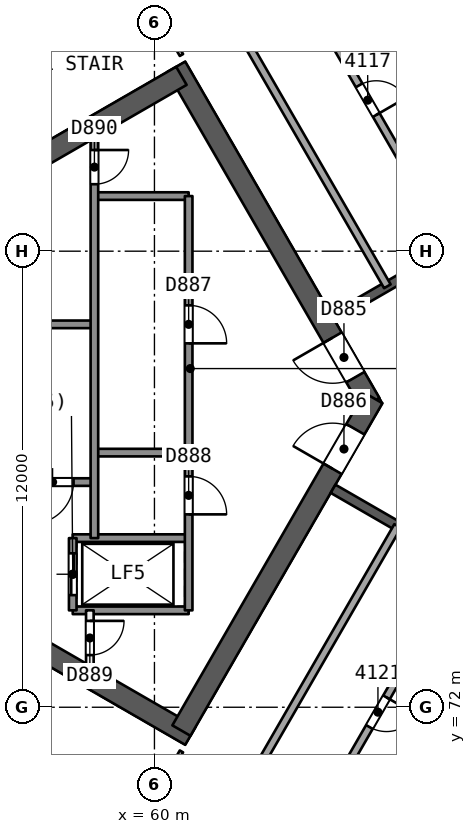
"""IFC4 building model, lengths in metres.
Left out: names, types, materials, properties, quantities, classifications, styles, units other than length and angle.
Written with IfcOpenShell. Run it as: python <this file> out.ifc"""

import sys

from ifc_helpers import new_model, si_unit, direction, frame, frame_2d, origin, place, context, subcontext, project, spatial, rectangle, extrude, element, fill, save


model = new_model("IFC4")
c1 = context("Model", 3, precision=1e-05, world=origin(), true_north=direction((0.0, 1.0)))
c2 = subcontext(c1, "Body", "Model", "MODEL_VIEW")
j1 = project(units=[si_unit("LENGTHUNIT", "METRE"), si_unit("PLANEANGLEUNIT", "RADIAN")], contexts=[c1])
p1 = place(None, origin())
s1 = spatial("IfcSite", under=j1, at=p1, CompositionType="ELEMENT")
p2 = place(p1, origin())
s2 = spatial("IfcBuilding", under=s1, at=p2, CompositionType="ELEMENT")
p3 = place(p2, frame((0.0, 0.0, 171.1)))
s3 = spatial("IfcBuildingStorey", under=s2, at=p3, CompositionType="ELEMENT", Elevation=171.1)
p4 = place(p3, frame((65.682, 80.0, 0.0), z_axis=(0.0, 0.0, 1.0), x_axis=(-0.500000202252, 0.866025287014, 0.0)))
e1 = element("IfcWall", 1, at=p4, inside=s3, PredefinedType="SHEAR", context=c2, shape_type="SweptSolid", body=[
    extrude(rectangle(XDim=10.221, YDim=0.55, at=frame_2d((5.111, 0.0))), origin(), (0.0, 0.0, 1.0), 3.7),
])
p5 = place(p4, frame((0.791, 0.0, 0.0)))
e2 = element("IfcOpeningElement", 2, at=p5, cuts=e1, PredefinedType="OPENING", context=c2, shape_type="SweptSolid", body=[
    extrude(rectangle(XDim=1.2, YDim=2.1, at=frame_2d((0.6, 1.05))), frame((0.0, 0.286, 0.0), z_axis=(0.0, -1.0, 0.0), x_axis=(1.0, 0.0, 0.0)), (0.0, 0.0, 1.0), 0.571),
])
p6 = place(p3, frame((60.709, 88.614, 0.0), z_axis=(0.0, 0.0, 1.0), x_axis=(-0.866020164116, -0.500009075263, 0.0)))
e3 = element("IfcWall", 3, at=p6, inside=s3, PredefinedType="SHEAR", context=c2, shape_type="SweptSolid", body=[
    extrude(rectangle(XDim=14.058, YDim=0.55, at=frame_2d((7.029, 0.0))), origin(), (0.0, 0.0, 1.0), 3.7),
])
p7 = place(p3, frame((48.672, 78.336, 0.0), z_axis=(0.0, 0.0, 1.0), x_axis=(0.866023530946, -0.500003243837, 0.0)))
e4 = element("IfcWall", 4, at=p7, inside=s3, PredefinedType="SHEAR", context=c2, shape_type="SweptSolid", body=[
    extrude(rectangle(XDim=14.175, YDim=0.55, at=frame_2d((7.087, 0.0))), origin(), (0.0, 0.0, 1.0), 3.7),
])
p8 = place(p3, frame((60.709, 71.386, 0.0), z_axis=(0.0, 0.0, 1.0), x_axis=(0.500015938302, 0.866016201606, 0.0)))
e5 = element("IfcWall", 5, at=p8, inside=s3, PredefinedType="SHEAR", context=c2, shape_type="SweptSolid", body=[
    extrude(rectangle(XDim=10.105, YDim=0.55, at=frame_2d((5.053, 0.0))), origin(), (0.0, 0.0, 1.0), 3.7),
])
p9 = place(p8, frame((7.955, 0.0, 0.0)))
e6 = element("IfcOpeningElement", 6, at=p9, cuts=e5, PredefinedType="OPENING", context=c2, shape_type="SweptSolid", body=[
    extrude(rectangle(XDim=1.2, YDim=2.1, at=frame_2d((0.6, 1.05))), frame((0.0, 0.286, 0.0), z_axis=(0.0, -1.0, 0.0), x_axis=(1.0, 0.0, 0.0)), (0.0, 0.0, 1.0), 0.571),
])
p10 = place(p3, frame((78.2, 90.046, 0.0), z_axis=(0.0, 0.0, 1.0), x_axis=(-0.866026492143, -0.499998114903, 0.0)))
e7 = element("IfcWall", 7, at=p10, inside=s3, PredefinedType="SHEAR", context=c2, shape_type="SweptSolid", body=[
    extrude(rectangle(XDim=15.588, YDim=0.25, at=frame_2d((7.794, 0.0))), origin(), (0.0, 0.0, 1.0), 3.25),
])
p11 = place(p10, frame((3.138, 0.0, 0.0)))
e8 = element("IfcOpeningElement", 8, at=p11, cuts=e7, PredefinedType="OPENING", context=c2, shape_type="SweptSolid", body=[
    extrude(rectangle(XDim=1.0, YDim=2.1, at=frame_2d((0.5, 1.05))), frame((0.0, 0.135, 0.0), z_axis=(0.0, -1.0, 0.0), x_axis=(1.0, 0.0, 0.0)), (0.0, 0.0, 1.0), 0.271),
])
p12 = place(p10, frame((5.629, 0.0, 0.0)))
e9 = element("IfcOpeningElement", 9, at=p12, cuts=e7, PredefinedType="OPENING", context=c2, shape_type="SweptSolid", body=[
    extrude(rectangle(XDim=0.9, YDim=2.1, at=frame_2d((0.45, 1.05))), frame((0.0, 0.135, 0.0), z_axis=(0.0, -1.0, 0.0), x_axis=(1.0, 0.0, 0.0)), (0.0, 0.0, 1.0), 0.271),
])
p13 = place(p10, frame((8.435, 0.0, 0.0)))
e10 = element("IfcOpeningElement", 10, at=p13, cuts=e7, PredefinedType="OPENING", context=c2, shape_type="SweptSolid", body=[
    extrude(rectangle(XDim=0.9, YDim=2.1, at=frame_2d((0.45, 1.05))), frame((0.0, 0.135, 0.0), z_axis=(0.0, -1.0, 0.0), x_axis=(1.0, 0.0, 0.0)), (0.0, 0.0, 1.0), 0.271),
])
p14 = place(p10, frame((12.438, 0.0, 0.0)))
e11 = element("IfcOpeningElement", 11, at=p14, cuts=e7, PredefinedType="OPENING", context=c2, shape_type="SweptSolid", body=[
    extrude(rectangle(XDim=1.0, YDim=2.1, at=frame_2d((0.5, 1.05))), frame((0.0, 0.135, 0.0), z_axis=(0.0, -1.0, 0.0), x_axis=(1.0, 0.0, 0.0)), (0.0, 0.0, 1.0), 0.271),
])
p15 = place(p3, frame((64.7, 77.748, 0.0), z_axis=(0.0, 0.0, 1.0), x_axis=(0.866026492143, -0.499998114903, 0.0)))
e12 = element("IfcWall", 12, at=p15, inside=s3, PredefinedType="SHEAR", context=c2, shape_type="SweptSolid", body=[
    extrude(rectangle(XDim=15.588, YDim=0.25, at=frame_2d((7.794, 0.0))), origin(), (0.0, 0.0, 1.0), 3.25),
])
p16 = place(p15, frame((2.462, 0.0, 0.0)))
e13 = element("IfcOpeningElement", 13, at=p16, cuts=e12, PredefinedType="OPENING", context=c2, shape_type="SweptSolid", body=[
    extrude(rectangle(XDim=1.0, YDim=2.1, at=frame_2d((0.5, 1.05))), frame((0.0, 0.135, 0.0), z_axis=(0.0, -1.0, 0.0), x_axis=(1.0, 0.0, 0.0)), (0.0, 0.0, 1.0), 0.271),
])
p17 = place(p15, frame((8.129, 0.0, 0.0)))
e14 = element("IfcOpeningElement", 14, at=p17, cuts=e12, PredefinedType="OPENING", context=c2, shape_type="SweptSolid", body=[
    extrude(rectangle(XDim=1.2, YDim=2.4, at=frame_2d((0.6, 1.2))), frame((0.0, 0.135, 0.0), z_axis=(0.0, -1.0, 0.0), x_axis=(1.0, 0.0, 0.0)), (0.0, 0.0, 1.0), 0.271),
])
p18 = place(p15, frame((11.762, 0.0, 0.0)))
e15 = element("IfcOpeningElement", 15, at=p18, cuts=e12, PredefinedType="OPENING", context=c2, shape_type="SweptSolid", body=[
    extrude(rectangle(XDim=1.0, YDim=2.1, at=frame_2d((0.5, 1.05))), frame((0.0, 0.135, 0.0), z_axis=(0.0, -1.0, 0.0), x_axis=(1.0, 0.0, 0.0)), (0.0, 0.0, 1.0), 0.271),
])
for number, where, z_axis, x_axis in (
    (16, (66.019, 96.179, 0.0), (0.0, 0.0, 1.0), (0.5, -0.866, 0.0)),
    (17, (63.589, 94.776, 0.0), (0.0, 0.0, 1.0), (0.5, -0.866, 0.0)),
):
    element("IfcWall", number, at=place(p3, frame(where, z_axis=z_axis, x_axis=x_axis)), inside=s3, PredefinedType="PARTITIONING", context=c2, shape_type="SweptSolid", body=[
        extrude(rectangle(XDim=11.402, YDim=0.2, at=frame_2d((5.701, 0.0))), origin(), (0.0, 0.0, 1.0), 3.25),
    ])
p19 = place(p3, frame((58.999, 92.126, 0.0), z_axis=(0.0, 0.0, 1.0), x_axis=(0.499981725576, -0.866035954271, 0.0)))
e18 = element("IfcWall", 18, at=p19, inside=s3, PredefinedType="PARTITIONING", context=c2, shape_type="SweptSolid", body=[
    extrude(rectangle(XDim=3.424, YDim=0.1, at=frame_2d((1.712, 0.0))), origin(), (0.0, 0.0, 1.0), 3.25),
])
p20 = place(p19, frame((1.262, 0.0, 0.0)))
e19 = element("IfcOpeningElement", 19, at=p20, cuts=e18, PredefinedType="OPENING", context=c2, shape_type="SweptSolid", body=[
    extrude(rectangle(XDim=0.9, YDim=2.1, at=frame_2d((0.45, 1.05))), frame((0.0, 0.061, 0.0), z_axis=(0.0, -1.0, 0.0), x_axis=(1.0, 0.0, 0.0)), (0.0, 0.0, 1.0), 0.121),
])
p21 = place(p3, frame((66.129, 83.077, 0.0), z_axis=(0.0, 0.0, 1.0), x_axis=(-0.5000018851, 0.866024315419, 0.0)))
e20 = element("IfcWall", 20, at=p21, inside=s3, PredefinedType="PARTITIONING", context=c2, shape_type="SweptSolid", body=[
    extrude(rectangle(XDim=9.0, YDim=0.2, at=frame_2d((4.5, 0.0))), origin(), (0.0, 0.0, 1.0), 3.25),
])
p22 = place(p3, frame((63.361, 91.871, 0.0), z_axis=(0.0, 0.0, 1.0), x_axis=(0.5000018851, -0.866024315419, 0.0)))
e21 = element("IfcWall", 21, at=p22, inside=s3, PredefinedType="PARTITIONING", context=c2, shape_type="SweptSolid", body=[
    extrude(rectangle(XDim=9.0, YDim=0.2, at=frame_2d((4.5, 0.0))), origin(), (0.0, 0.0, 1.0), 3.25),
])
p23 = place(p22, frame((4.05, 0.0, 0.0)))
e22 = element("IfcOpeningElement", 22, at=p23, cuts=e21, PredefinedType="OPENING", context=c2, shape_type="SweptSolid", body=[
    extrude(rectangle(XDim=0.9, YDim=2.1, at=frame_2d((0.45, 1.05))), frame((0.0, 0.11, 0.0), z_axis=(0.0, -1.0, 0.0), x_axis=(1.0, 0.0, 0.0)), (0.0, 0.0, 1.0), 0.221),
])
p24 = place(p3, frame((60.71, 70.838, 0.0), z_axis=(0.0, 0.0, 1.0), x_axis=(-0.499981725576, -0.866035954271, 0.0)))
e23 = element("IfcWall", 23, at=p24, inside=s3, PredefinedType="PARTITIONING", context=c2, shape_type="SweptSolid", body=[
    extrude(rectangle(XDim=3.424, YDim=0.1, at=frame_2d((1.712, 0.0))), origin(), (0.0, 0.0, 1.0), 3.25),
])
p25 = place(p24, frame((1.262, 0.0, 0.0)))
e24 = element("IfcOpeningElement", 24, at=p25, cuts=e23, PredefinedType="OPENING", context=c2, shape_type="SweptSolid", body=[
    extrude(rectangle(XDim=0.9, YDim=2.1, at=frame_2d((0.45, 1.05))), frame((0.0, 0.061, 0.0), z_axis=(0.0, -1.0, 0.0), x_axis=(1.0, 0.0, 0.0)), (0.0, 0.0, 1.0), 0.121),
])
p26 = place(p3, frame((68.131, 75.767, 0.0), z_axis=(0.0, 0.0, 1.0), x_axis=(-0.5000018851, -0.866024315419, 0.0)))
e25 = element("IfcWall", 25, at=p26, inside=s3, PredefinedType="PARTITIONING", context=c2, shape_type="SweptSolid", body=[
    extrude(rectangle(XDim=9.0, YDim=0.2, at=frame_2d((4.5, 0.0))), origin(), (0.0, 0.0, 1.0), 3.25),
])
p27 = place(p26, frame((4.05, 0.0, 0.0)))
e26 = element("IfcOpeningElement", 26, at=p27, cuts=e25, PredefinedType="OPENING", context=c2, shape_type="SweptSolid", body=[
    extrude(rectangle(XDim=0.9, YDim=2.1, at=frame_2d((0.45, 1.05))), frame((0.0, 0.11, 0.0), z_axis=(0.0, -1.0, 0.0), x_axis=(1.0, 0.0, 0.0)), (0.0, 0.0, 1.0), 0.221),
])
p28 = place(p3, frame((61.899, 68.973, 0.0), z_axis=(0.0, 0.0, 1.0), x_axis=(0.5000018851, 0.866024315419, 0.0)))
e27 = element("IfcWall", 27, at=p28, inside=s3, PredefinedType="PARTITIONING", context=c2, shape_type="SweptSolid", body=[
    extrude(rectangle(XDim=9.0, YDim=0.2, at=frame_2d((4.5, 0.0))), origin(), (0.0, 0.0, 1.0), 3.25),
])
p29 = place(p3, frame((64.129, 64.912, 0.0), z_axis=(0.0, 0.0, 1.0), x_axis=(0.499998613539, 0.866026204257, 0.0)))
e28 = element("IfcWall", 28, at=p29, inside=s3, PredefinedType="PARTITIONING", context=c2, shape_type="SweptSolid", body=[
    extrude(rectangle(XDim=11.402, YDim=0.2, at=frame_2d((5.701, 0.0))), origin(), (0.0, 0.0, 1.0), 3.25),
])
p30 = place(p3, frame((42.45, 82.744, 0.0), z_axis=(0.0, 0.0, 1.0), x_axis=(0.866024128163, 0.500002209434, 0.0)))
e29 = element("IfcWall", 29, at=p30, inside=s3, PredefinedType="SOLIDWALL", context=c2, shape_type="SweptSolid", body=[
    extrude(rectangle(XDim=53.635, YDim=0.3, at=frame_2d((26.817, 0.0))), origin(), (0.0, 0.0, 1.0), 3.25),
])
p31 = place(p30, frame((20.473, 0.0, 0.0)))
e30 = element("IfcOpeningElement", 30, at=p31, cuts=e29, PredefinedType="OPENING", context=c2, shape_type="SweptSolid", body=[
    extrude(rectangle(XDim=2.4, YDim=2.4, at=frame_2d((1.2, 1.2))), frame((0.0, 0.161, 0.0), z_axis=(0.0, -1.0, 0.0), x_axis=(1.0, 0.0, 0.0)), (0.0, 0.0, 1.0), 0.321),
])
p32 = place(p30, frame((9.514, 0.0, 0.0)))
e31 = element("IfcOpeningElement", 31, at=p32, cuts=e29, PredefinedType="OPENING", context=c2, shape_type="SweptSolid", body=[
    extrude(rectangle(XDim=2.4, YDim=2.4, at=frame_2d((1.2, 1.2))), frame((0.0, 0.161, 0.0), z_axis=(0.0, -1.0, 0.0), x_axis=(1.0, 0.0, 0.0)), (0.0, 0.0, 1.0), 0.321),
])
p33 = place(p30, frame((40.628, 0.0, 0.0)))
e32 = element("IfcOpeningElement", 32, at=p33, cuts=e29, PredefinedType="OPENING", context=c2, shape_type="SweptSolid", body=[
    extrude(rectangle(XDim=2.4, YDim=2.4, at=frame_2d((1.2, 1.2))), frame((0.0, 0.161, 0.0), z_axis=(0.0, -1.0, 0.0), x_axis=(1.0, 0.0, 0.0)), (0.0, 0.0, 1.0), 0.321),
])
p34 = place(p30, frame((27.632, 0.0, 0.9)))
e33 = element("IfcOpeningElement", 33, at=p34, cuts=e29, PredefinedType="OPENING", context=c2, shape_type="SweptSolid", body=[
    extrude(rectangle(XDim=1.8, YDim=1.5, at=frame_2d((0.9, 0.75))), frame((0.0, 0.161, 0.0), z_axis=(0.0, -1.0, 0.0), x_axis=(1.0, 0.0, 0.0)), (0.0, 0.0, 1.0), 0.321),
])
p35 = place(p30, frame((24.826, 0.0, 0.9)))
e34 = element("IfcOpeningElement", 34, at=p35, cuts=e29, PredefinedType="OPENING", context=c2, shape_type="SweptSolid", body=[
    extrude(rectangle(XDim=1.8, YDim=1.5, at=frame_2d((0.9, 0.75))), frame((0.0, 0.161, 0.0), z_axis=(0.0, -1.0, 0.0), x_axis=(1.0, 0.0, 0.0)), (0.0, 0.0, 1.0), 0.321),
])
p36 = place(p3, frame((88.899, 50.439, 0.0), z_axis=(0.0, 0.0, 1.0), x_axis=(-0.866024128163, 0.500002209434, 0.0)))
e35 = element("IfcWall", 35, at=p36, inside=s3, PredefinedType="SOLIDWALL", context=c2, shape_type="SweptSolid", body=[
    extrude(rectangle(XDim=53.635, YDim=0.3, at=frame_2d((26.817, 0.0))), origin(), (0.0, 0.0, 1.0), 3.25),
])
p37 = place(p36, frame((30.45, 0.0, 0.0)))
e36 = element("IfcOpeningElement", 36, at=p37, cuts=e35, PredefinedType="OPENING", context=c2, shape_type="SweptSolid", body=[
    extrude(rectangle(XDim=2.4, YDim=2.4, at=frame_2d((1.2, 1.2))), frame((0.0, 0.161, 0.0), z_axis=(0.0, -1.0, 0.0), x_axis=(1.0, 0.0, 0.0)), (0.0, 0.0, 1.0), 0.321),
])
p38 = place(p36, frame((41.683, 0.0, 0.0)))
e37 = element("IfcOpeningElement", 37, at=p38, cuts=e35, PredefinedType="OPENING", context=c2, shape_type="SweptSolid", body=[
    extrude(rectangle(XDim=2.4, YDim=2.4, at=frame_2d((1.2, 1.2))), frame((0.0, 0.161, 0.0), z_axis=(0.0, -1.0, 0.0), x_axis=(1.0, 0.0, 0.0)), (0.0, 0.0, 1.0), 0.321),
])
p39 = place(p36, frame((10.295, 0.0, 0.0)))
e38 = element("IfcOpeningElement", 38, at=p39, cuts=e35, PredefinedType="OPENING", context=c2, shape_type="SweptSolid", body=[
    extrude(rectangle(XDim=2.4, YDim=2.4, at=frame_2d((1.2, 1.2))), frame((0.0, 0.161, 0.0), z_axis=(0.0, -1.0, 0.0), x_axis=(1.0, 0.0, 0.0)), (0.0, 0.0, 1.0), 0.321),
])
p40 = place(p36, frame((24.982, 0.0, 0.9)))
e39 = element("IfcOpeningElement", 39, at=p40, cuts=e35, PredefinedType="OPENING", context=c2, shape_type="SweptSolid", body=[
    extrude(rectangle(XDim=1.8, YDim=1.5, at=frame_2d((0.9, 0.75))), frame((0.0, 0.161, 0.0), z_axis=(0.0, -1.0, 0.0), x_axis=(1.0, 0.0, 0.0)), (0.0, 0.0, 1.0), 0.321),
])
p41 = place(p3, frame((60.9, 85.45, 0.0), z_axis=(0.0, 0.0, 1.0), x_axis=(-1.0, 0.0, 0.0)))
e40 = element("IfcWall", 40, at=p41, inside=s3, PredefinedType="SOLIDWALL", context=c2, shape_type="SweptSolid", body=[
    extrude(rectangle(XDim=2.48, YDim=0.2, at=frame_2d((1.24, 0.0))), origin(), (0.0, 0.0, 1.0), 3.25),
])
p42 = place(p3, frame((58.42, 82.075, 0.0), z_axis=(0.0, 0.0, 1.0), x_axis=(-1.0, 0.0, 0.0)))
e41 = element("IfcWall", 41, at=p42, inside=s3, PredefinedType="SOLIDWALL", context=c2, shape_type="SweptSolid", body=[
    extrude(rectangle(XDim=7.7, YDim=0.2, at=frame_2d((3.85, 0.0))), origin(), (0.0, 0.0, 1.0), 3.25),
])
p43 = place(p3, frame((60.9, 78.7, 0.0), z_axis=(0.0, 0.0, 1.0), x_axis=(-1.0, 0.0, 0.0)))
e42 = element("IfcWall", 42, at=p43, inside=s3, PredefinedType="SOLIDWALL", context=c2, shape_type="SweptSolid", body=[
    extrude(rectangle(XDim=2.48, YDim=0.2, at=frame_2d((1.24, 0.0))), origin(), (0.0, 0.0, 1.0), 3.25),
])
p44 = place(p3, frame((58.42, 77.925, 0.0), z_axis=(0.0, 0.0, 1.0), x_axis=(-1.0, 0.0, 0.0)))
e43 = element("IfcWall", 43, at=p44, inside=s3, PredefinedType="SOLIDWALL", context=c2, shape_type="SweptSolid", body=[
    extrude(rectangle(XDim=7.7, YDim=0.2, at=frame_2d((3.85, 0.0))), origin(), (0.0, 0.0, 1.0), 3.25),
])
p45 = place(p44, frame((0.55, 0.0, 0.0)))
e44 = element("IfcOpeningElement", 44, at=p45, cuts=e43, PredefinedType="OPENING", context=c2, shape_type="SweptSolid", body=[
    extrude(rectangle(XDim=1.1, YDim=2.1, at=frame_2d((0.55, 1.05))), frame((0.0, 0.11, 0.0), z_axis=(0.0, -1.0, 0.0), x_axis=(1.0, 0.0, 0.0)), (0.0, 0.0, 1.0), 0.221),
])
for number, where, z_axis, x_axis in (
    (45, (60.9, 76.45, 0.0), (0.0, 0.0, 1.0), (-1.0, 0.0, 0.0)),
    (46, (60.9, 74.55, 0.0), (0.0, 0.0, 1.0), (-1.0, 0.0, 0.0)),
):
    element("IfcWall", number, at=place(p3, frame(where, z_axis=z_axis, x_axis=x_axis)), inside=s3, PredefinedType="SOLIDWALL", context=c2, shape_type="SweptSolid", body=[
        extrude(rectangle(XDim=3.05, YDim=0.2, at=frame_2d((1.525, 0.0))), origin(), (0.0, 0.0, 1.0), 3.25),
    ])
p46 = place(p3, frame((60.9, 85.45, 0.0), z_axis=(0.0, 0.0, 1.0), x_axis=(0.0, -1.0, 0.0)))
e47 = element("IfcWall", 47, at=p46, inside=s3, PredefinedType="SOLIDWALL", context=c2, shape_type="SweptSolid", body=[
    extrude(rectangle(XDim=10.9, YDim=0.2, at=frame_2d((5.45, 0.0))), origin(), (0.0, 0.0, 1.0), 3.25),
])
p47 = place(p46, frame((2.875, 0.0, 0.0)))
e48 = element("IfcOpeningElement", 48, at=p47, cuts=e47, PredefinedType="OPENING", context=c2, shape_type="SweptSolid", body=[
    extrude(rectangle(XDim=1.0, YDim=2.1, at=frame_2d((0.5, 1.05))), frame((0.0, 0.11, 0.0), z_axis=(0.0, -1.0, 0.0), x_axis=(1.0, 0.0, 0.0)), (0.0, 0.0, 1.0), 0.221),
])
p48 = place(p46, frame((7.375, 0.0, 0.0)))
e49 = element("IfcOpeningElement", 49, at=p48, cuts=e47, PredefinedType="OPENING", context=c2, shape_type="SweptSolid", body=[
    extrude(rectangle(XDim=1.0, YDim=2.1, at=frame_2d((0.5, 1.05))), frame((0.0, 0.11, 0.0), z_axis=(0.0, -1.0, 0.0), x_axis=(1.0, 0.0, 0.0)), (0.0, 0.0, 1.0), 0.221),
])
p49 = place(p3, frame((58.42, 86.974, 0.0), z_axis=(0.0, 0.0, 1.0), x_axis=(0.0, -1.0, 0.0)))
e50 = element("IfcWall", 50, at=p49, inside=s3, PredefinedType="SOLIDWALL", context=c2, shape_type="SweptSolid", body=[
    extrude(rectangle(XDim=10.524, YDim=0.2, at=frame_2d((5.262, 0.0))), origin(), (0.0, 0.0, 1.0), 3.25),
])
p50 = place(p49, frame((0.312, 0.0, 0.0)))
e51 = element("IfcOpeningElement", 51, at=p50, cuts=e50, PredefinedType="OPENING", context=c2, shape_type="SweptSolid", body=[
    extrude(rectangle(XDim=0.9, YDim=2.1, at=frame_2d((0.45, 1.05))), frame((0.0, 0.11, 0.0), z_axis=(0.0, -1.0, 0.0), x_axis=(1.0, 0.0, 0.0)), (0.0, 0.0, 1.0), 0.221),
])
p51 = place(p3, frame((58.3, 74.55, 0.0), z_axis=(0.0, 0.0, 1.0), x_axis=(0.0, -1.0, 0.0)))
e52 = element("IfcWall", 52, at=p51, inside=s3, PredefinedType="PARTITIONING", context=c2, shape_type="SweptSolid", body=[
    extrude(rectangle(XDim=1.455, YDim=0.2, at=frame_2d((0.728, 0.0))), origin(), (0.0, 0.0, 1.0), 3.25),
])
p52 = place(p51, frame((0.278, 0.0, 0.0)))
e53 = element("IfcOpeningElement", 53, at=p52, cuts=e52, PredefinedType="OPENING", context=c2, shape_type="SweptSolid", body=[
    extrude(rectangle(XDim=0.9, YDim=2.1, at=frame_2d((0.45, 1.05))), frame((0.0, 0.11, 0.0), z_axis=(0.0, -1.0, 0.0), x_axis=(1.0, 0.0, 0.0)), (0.0, 0.0, 1.0), 0.221),
])
p53 = place(p3, frame((57.85, 76.45, 0.0), z_axis=(0.0, 0.0, 1.0), x_axis=(0.0, -1.0, 0.0)))
e54 = element("IfcWall", 54, at=p53, inside=s3, PredefinedType="SOLIDWALL", context=c2, shape_type="SweptSolid", body=[
    extrude(rectangle(XDim=1.9, YDim=0.2, at=frame_2d((0.95, 0.0))), origin(), (0.0, 0.0, 1.0), 3.25),
])
p54 = place(p53, frame((0.4, 0.0, 0.0)))
e55 = element("IfcOpeningElement", 55, at=p54, cuts=e54, PredefinedType="OPENING", context=c2, shape_type="SweptSolid", body=[
    extrude(rectangle(XDim=1.1, YDim=2.1, at=frame_2d((0.55, 1.05))), frame((0.0, 0.11, 0.0), z_axis=(0.0, -1.0, 0.0), x_axis=(1.0, 0.0, 0.0)), (0.0, 0.0, 1.0), 0.221),
])
p55 = place(p23, origin())
e56 = element("IfcDoor", 56, at=p55, inside=s3, OperationType="SINGLE_SWING_RIGHT", PredefinedType="NOTDEFINED", context=c2, shape_type="SweptSolid", body=[
    extrude(rectangle(XDim=0.9, YDim=2.1, at=frame_2d((0.45, 1.05))), frame((0.0, 0.025, 0.0), z_axis=(0.0, -1.0, 0.0), x_axis=(1.0, 0.0, 0.0)), (0.0, 0.0, 1.0), 0.05),
])
fill(e22, e56)
p56 = place(p27, origin())
e57 = element("IfcDoor", 57, at=p56, inside=s3, OperationType="SINGLE_SWING_LEFT", PredefinedType="NOTDEFINED", context=c2, shape_type="SweptSolid", body=[
    extrude(rectangle(XDim=0.9, YDim=2.1, at=frame_2d((0.45, 1.05))), frame((0.0, 0.025, 0.0), z_axis=(0.0, -1.0, 0.0), x_axis=(1.0, 0.0, 0.0)), (0.0, 0.0, 1.0), 0.05),
])
fill(e26, e57)
p57 = place(p5, origin())
e58 = element("IfcDoor", 58, at=p57, inside=s3, OperationType="SINGLE_SWING_RIGHT", PredefinedType="NOTDEFINED", context=c2, shape_type="SweptSolid", body=[
    extrude(rectangle(XDim=1.2, YDim=2.1, at=frame_2d((0.6, 1.05))), frame((0.0, 0.025, 0.0), z_axis=(0.0, -1.0, 0.0), x_axis=(1.0, 0.0, 0.0)), (0.0, 0.0, 1.0), 0.05),
])
fill(e2, e58)
p58 = place(p9, origin())
e59 = element("IfcDoor", 59, at=p58, inside=s3, OperationType="SINGLE_SWING_LEFT", PredefinedType="NOTDEFINED", context=c2, shape_type="SweptSolid", body=[
    extrude(rectangle(XDim=1.2, YDim=2.1, at=frame_2d((0.6, 1.05))), frame((0.0, 0.025, 0.0), z_axis=(0.0, -1.0, 0.0), x_axis=(1.0, 0.0, 0.0)), (0.0, 0.0, 1.0), 0.05),
])
fill(e6, e59)
p59 = place(p54, origin())
e60 = element("IfcDoor", 60, at=p59, inside=s3, OperationType="SLIDING_TO_RIGHT", PredefinedType="NOTDEFINED", context=c2, shape_type="SweptSolid", body=[
    extrude(rectangle(XDim=1.1, YDim=2.1, at=frame_2d((0.55, 1.05))), frame((0.0, 0.025, 0.0), z_axis=(0.0, -1.0, 0.0), x_axis=(1.0, 0.0, 0.0)), (0.0, 0.0, 1.0), 0.05),
])
fill(e55, e60)
p60 = place(p47, origin())
e61 = element("IfcDoor", 61, at=p60, inside=s3, OperationType="SINGLE_SWING_RIGHT", PredefinedType="NOTDEFINED", context=c2, shape_type="SweptSolid", body=[
    extrude(rectangle(XDim=1.0, YDim=2.1, at=frame_2d((0.5, 1.05))), frame((0.0, 0.025, 0.0), z_axis=(0.0, -1.0, 0.0), x_axis=(1.0, 0.0, 0.0)), (0.0, 0.0, 1.0), 0.05),
])
fill(e48, e61)
p61 = place(p48, origin())
e62 = element("IfcDoor", 62, at=p61, inside=s3, OperationType="SINGLE_SWING_RIGHT", PredefinedType="NOTDEFINED", context=c2, shape_type="SweptSolid", body=[
    extrude(rectangle(XDim=1.0, YDim=2.1, at=frame_2d((0.5, 1.05))), frame((0.0, 0.025, 0.0), z_axis=(0.0, -1.0, 0.0), x_axis=(1.0, 0.0, 0.0)), (0.0, 0.0, 1.0), 0.05),
])
fill(e49, e62)
p62 = place(p52, origin())
e63 = element("IfcDoor", 63, at=p62, inside=s3, OperationType="SINGLE_SWING_LEFT", PredefinedType="NOTDEFINED", context=c2, shape_type="SweptSolid", body=[
    extrude(rectangle(XDim=0.9, YDim=2.1, at=frame_2d((0.45, 1.05))), frame((0.0, 0.025, 0.0), z_axis=(0.0, -1.0, 0.0), x_axis=(1.0, 0.0, 0.0)), (0.0, 0.0, 1.0), 0.05),
])
fill(e53, e63)
p63 = place(p50, origin())
e64 = element("IfcDoor", 64, at=p63, inside=s3, OperationType="SINGLE_SWING_LEFT", PredefinedType="NOTDEFINED", context=c2, shape_type="SweptSolid", body=[
    extrude(rectangle(XDim=0.9, YDim=2.1, at=frame_2d((0.45, 1.05))), frame((0.0, 0.025, 0.0), z_axis=(0.0, -1.0, 0.0), x_axis=(1.0, 0.0, 0.0)), (0.0, 0.0, 1.0), 0.05),
])
fill(e51, e64)
p64 = place(p45, origin())
e65 = element("IfcDoor", 65, at=p64, inside=s3, OperationType="SINGLE_SWING_RIGHT", PredefinedType="NOTDEFINED", context=c2, shape_type="SweptSolid", body=[
    extrude(rectangle(XDim=1.1, YDim=2.1, at=frame_2d((0.55, 1.05))), frame((0.0, 0.025, 0.0), z_axis=(0.0, -1.0, 0.0), x_axis=(1.0, 0.0, 0.0)), (0.0, 0.0, 1.0), 0.05),
])
fill(e44, e65)
save(model, sys.argv[1])
